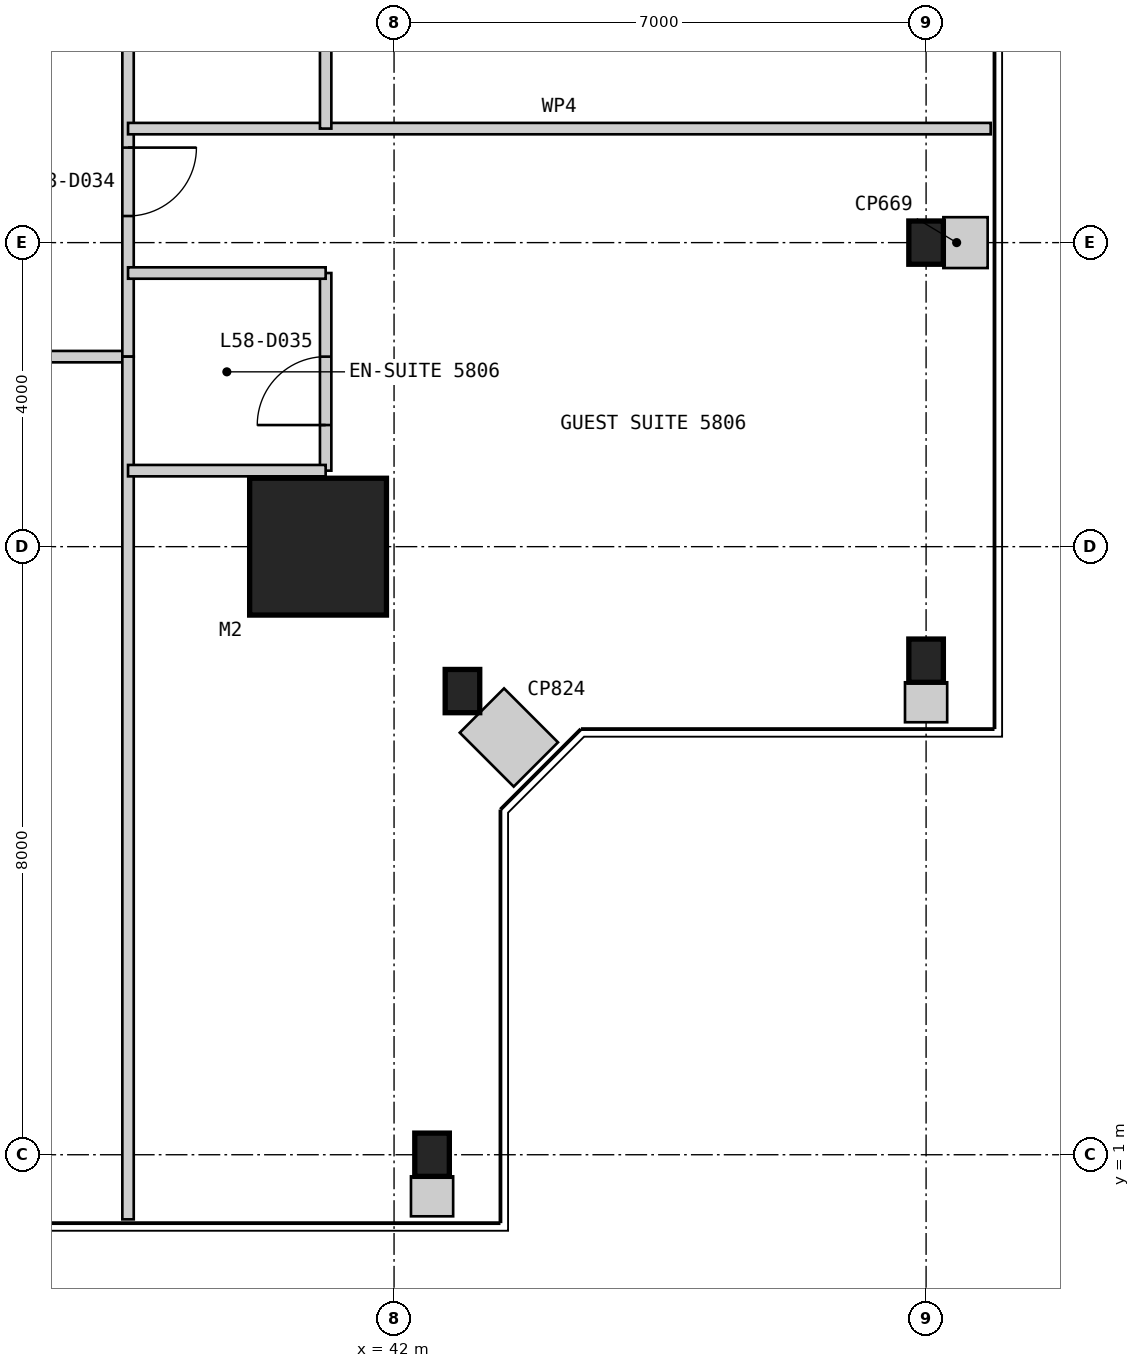
"""IFC4 building model, lengths in metres.
Left out: names, types, materials, properties, quantities, classifications, styles, units other than length and angle.
Written with IfcOpenShell. Run it as: python <this file> out.ifc"""

import sys

from ifc_helpers import new_model, si_unit, direction, frame, frame_2d, origin, origin_2d, place, context, subcontext, project, spatial, rectangle, i_section, extrude, element, fill, save


model = new_model("IFC4")
c1 = context("Model", 3, precision=1e-05, world=origin(), true_north=direction((0.0, 1.0)))
c2 = subcontext(c1, "Body", "Model", "MODEL_VIEW")
j1 = project(units=[si_unit("LENGTHUNIT", "METRE"), si_unit("PLANEANGLEUNIT", "RADIAN")], contexts=[c1])
p1 = place(None, origin())
s1 = spatial("IfcSite", under=j1, at=p1, CompositionType="ELEMENT")
p2 = place(p1, origin())
s2 = spatial("IfcBuilding", under=s1, at=p2, CompositionType="ELEMENT")
p3 = place(p2, frame((0.0, 0.0, 249.2)))
s3 = spatial("IfcBuildingStorey", under=s2, at=p3, CompositionType="ELEMENT", Elevation=249.2)
p4 = place(p3, frame((41.0, 9.0, 0.0), z_axis=(0.0, 0.0, 1.0), x_axis=(1.0, 0.0, 0.0)))
e1 = element("IfcColumn", 1, at=p4, inside=s3, PredefinedType="COLUMN", context=c2, shape_type="SweptSolid", body=[
    extrude(rectangle(XDim=1.8, YDim=1.8, at=origin_2d()), origin(), (0.0, 0.0, 1.0), 3.4),
])
for number, where, z_axis, x_axis in (
    (2, (42.5, 1.0, 0.0), (0.0, 0.0, 1.0), (1.0, 0.0, 0.0)),
    (3, (42.9, 7.1, 0.0), (0.0, 0.0, 1.0), (1.0, 0.0, 0.0)),
    (4, (49.0, 7.5, 0.0), (0.0, 0.0, 1.0), (1.0, 0.0, 0.0)),
    (5, (49.0, 13.0, 0.0), (0.0, 0.0, 1.0), (1.0, 0.0, 0.0)),
):
    element("IfcColumn", number, at=place(p3, frame(where, z_axis=z_axis, x_axis=x_axis)), inside=s3, PredefinedType="COLUMN", context=c2, shape_type="SweptSolid", body=[
        extrude(i_section(OverallWidth=0.455, OverallDepth=0.569, WebThickness=0.078, FlangeThickness=0.125, at=origin_2d()), origin(), (0.0, 0.0, 1.0), 3.4),
    ])
p5 = place(p3, frame((11.5, 11.5, 0.0), z_axis=(0.0, 0.0, 1.0), x_axis=(1.0, 0.0, 0.0)))
e6 = element("IfcWall", 6, at=p5, inside=s3, PredefinedType="PARTITIONING", context=c2, shape_type="SweptSolid", body=[
    extrude(rectangle(XDim=27.0, YDim=0.15, at=frame_2d((13.5, 0.0))), origin(), (0.0, 0.0, 1.0), 3.25),
])
p6 = place(p5, frame((1.85, 0.0, 0.0)))
e7 = element("IfcOpeningElement", 7, at=p6, cuts=e6, PredefinedType="OPENING", context=c2, shape_type="SweptSolid", body=[
    extrude(rectangle(XDim=0.9, YDim=2.1, at=frame_2d((0.45, 1.05))), frame((0.0, 0.085, 0.0), z_axis=(0.0, -1.0, 0.0), x_axis=(1.0, 0.0, 0.0)), (0.0, 0.0, 1.0), 0.17),
])
p7 = place(p5, frame((6.2, 0.0, 0.0)))
e8 = element("IfcOpeningElement", 8, at=p7, cuts=e6, PredefinedType="OPENING", context=c2, shape_type="SweptSolid", body=[
    extrude(rectangle(XDim=0.9, YDim=2.1, at=frame_2d((0.45, 1.05))), frame((0.0, 0.085, 0.0), z_axis=(0.0, -1.0, 0.0), x_axis=(1.0, 0.0, 0.0)), (0.0, 0.0, 1.0), 0.17),
])
p8 = place(p5, frame((12.2, 0.0, 0.0)))
e9 = element("IfcOpeningElement", 9, at=p8, cuts=e6, PredefinedType="OPENING", context=c2, shape_type="SweptSolid", body=[
    extrude(rectangle(XDim=0.9, YDim=2.1, at=frame_2d((0.45, 1.05))), frame((0.0, 0.085, 0.0), z_axis=(0.0, -1.0, 0.0), x_axis=(1.0, 0.0, 0.0)), (0.0, 0.0, 1.0), 0.17),
])
p9 = place(p5, frame((18.8, 0.0, 0.0)))
e10 = element("IfcOpeningElement", 10, at=p9, cuts=e6, PredefinedType="OPENING", context=c2, shape_type="SweptSolid", body=[
    extrude(rectangle(XDim=1.0, YDim=2.1, at=frame_2d((0.5, 1.05))), frame((0.0, 0.085, 0.0), z_axis=(0.0, -1.0, 0.0), x_axis=(1.0, 0.0, 0.0)), (0.0, 0.0, 1.0), 0.17),
])
p10 = place(p5, frame((24.2, 0.0, 0.0)))
e11 = element("IfcOpeningElement", 11, at=p10, cuts=e6, PredefinedType="OPENING", context=c2, shape_type="SweptSolid", body=[
    extrude(rectangle(XDim=0.9, YDim=2.1, at=frame_2d((0.45, 1.05))), frame((0.0, 0.085, 0.0), z_axis=(0.0, -1.0, 0.0), x_axis=(1.0, 0.0, 0.0)), (0.0, 0.0, 1.0), 0.17),
])
p11 = place(p3, frame((38.5, 11.5, 0.0), z_axis=(0.0, 0.0, 1.0), x_axis=(0.0, 1.0, 0.0)))
e12 = element("IfcWall", 12, at=p11, inside=s3, PredefinedType="PARTITIONING", context=c2, shape_type="SweptSolid", body=[
    extrude(rectangle(XDim=27.0, YDim=0.15, at=frame_2d((13.5, 0.0))), origin(), (0.0, 0.0, 1.0), 3.25),
])
p12 = place(p11, frame((1.85, 0.0, 0.0)))
e13 = element("IfcOpeningElement", 13, at=p12, cuts=e12, PredefinedType="OPENING", context=c2, shape_type="SweptSolid", body=[
    extrude(rectangle(XDim=0.9, YDim=2.1, at=frame_2d((0.45, 1.05))), frame((0.0, 0.085, 0.0), z_axis=(0.0, -1.0, 0.0), x_axis=(1.0, 0.0, 0.0)), (0.0, 0.0, 1.0), 0.17),
])
p13 = place(p11, frame((6.2, 0.0, 0.0)))
e14 = element("IfcOpeningElement", 14, at=p13, cuts=e12, PredefinedType="OPENING", context=c2, shape_type="SweptSolid", body=[
    extrude(rectangle(XDim=0.9, YDim=2.1, at=frame_2d((0.45, 1.05))), frame((0.0, 0.085, 0.0), z_axis=(0.0, -1.0, 0.0), x_axis=(1.0, 0.0, 0.0)), (0.0, 0.0, 1.0), 0.17),
])
p14 = place(p11, frame((12.2, 0.0, 0.0)))
e15 = element("IfcOpeningElement", 15, at=p14, cuts=e12, PredefinedType="OPENING", context=c2, shape_type="SweptSolid", body=[
    extrude(rectangle(XDim=0.9, YDim=2.1, at=frame_2d((0.45, 1.05))), frame((0.0, 0.085, 0.0), z_axis=(0.0, -1.0, 0.0), x_axis=(1.0, 0.0, 0.0)), (0.0, 0.0, 1.0), 0.17),
])
p15 = place(p11, frame((18.2, 0.0, 0.0)))
e16 = element("IfcOpeningElement", 16, at=p15, cuts=e12, PredefinedType="OPENING", context=c2, shape_type="SweptSolid", body=[
    extrude(rectangle(XDim=0.9, YDim=2.1, at=frame_2d((0.45, 1.05))), frame((0.0, 0.085, 0.0), z_axis=(0.0, -1.0, 0.0), x_axis=(1.0, 0.0, 0.0)), (0.0, 0.0, 1.0), 0.17),
])
p16 = place(p11, frame((24.2, 0.0, 0.0)))
e17 = element("IfcOpeningElement", 17, at=p16, cuts=e12, PredefinedType="OPENING", context=c2, shape_type="SweptSolid", body=[
    extrude(rectangle(XDim=0.9, YDim=2.1, at=frame_2d((0.45, 1.05))), frame((0.0, 0.085, 0.0), z_axis=(0.0, -1.0, 0.0), x_axis=(1.0, 0.0, 0.0)), (0.0, 0.0, 1.0), 0.17),
])
p17 = place(p3, frame((38.5, 0.15, 0.0), z_axis=(0.0, 0.0, 1.0), x_axis=(0.0, 1.0, 0.0)))
e18 = element("IfcWall", 18, at=p17, inside=s3, PredefinedType="PARTITIONING", context=c2, shape_type="SweptSolid", body=[
    extrude(rectangle(XDim=11.35, YDim=0.15, at=frame_2d((5.675, 0.0))), origin(), (0.0, 0.0, 1.0), 3.25),
])
p18 = place(p3, frame((41.1, 10.0, 0.0), z_axis=(0.0, 0.0, 1.0), x_axis=(0.0, 1.0, 0.0)))
e19 = element("IfcWall", 19, at=p18, inside=s3, PredefinedType="PARTITIONING", context=c2, shape_type="SweptSolid", body=[
    extrude(rectangle(XDim=2.6, YDim=0.15, at=frame_2d((1.3, 0.0))), origin(), (0.0, 0.0, 1.0), 2.638),
])
p19 = place(p18, frame((0.6, 0.0, 0.0)))
e20 = element("IfcOpeningElement", 20, at=p19, cuts=e19, PredefinedType="OPENING", context=c2, shape_type="SweptSolid", body=[
    extrude(rectangle(XDim=0.9, YDim=2.1, at=frame_2d((0.45, 1.05))), frame((0.0, 0.085, 0.0), z_axis=(0.0, -1.0, 0.0), x_axis=(1.0, 0.0, 0.0)), (0.0, 0.0, 1.0), 0.17),
])
for number, where, z_axis, x_axis in (
    (21, (41.1, 10.0, 0.0), (0.0, 0.0, 1.0), (-1.0, 0.0, 0.0)),
    (22, (41.1, 12.6, 0.0), (0.0, 0.0, 1.0), (-1.0, 0.0, 0.0)),
):
    element("IfcWall", number, at=place(p3, frame(where, z_axis=z_axis, x_axis=x_axis)), inside=s3, PredefinedType="PARTITIONING", context=c2, shape_type="SweptSolid", body=[
        extrude(rectangle(XDim=2.6, YDim=0.15, at=frame_2d((1.3, 0.0))), origin(), (0.0, 0.0, 1.0), 3.25),
    ])
p20 = place(p3, frame((49.85, 14.5, 0.0), z_axis=(0.0, 0.0, 1.0), x_axis=(-1.0, 0.0, 0.0)))
e23 = element("IfcWall", 23, at=p20, inside=s3, PredefinedType="PARTITIONING", context=c2, shape_type="SweptSolid", body=[
    extrude(rectangle(XDim=11.35, YDim=0.15, at=frame_2d((5.675, 0.0))), origin(), (0.0, 0.0, 1.0), 3.25),
])
p21 = place(p3, frame((41.1, 14.5, 0.0), z_axis=(0.0, 0.0, 1.0), x_axis=(0.0, 1.0, 0.0)))
e24 = element("IfcWall", 24, at=p21, inside=s3, PredefinedType="PARTITIONING", context=c2, shape_type="SweptSolid", body=[
    extrude(rectangle(XDim=2.6, YDim=0.15, at=frame_2d((1.3, 0.0))), origin(), (0.0, 0.0, 1.0), 3.25),
])
p22 = place(p3, frame((42.5, 0.19, 0.0), z_axis=(0.0, 0.0, 1.0), x_axis=(0.0, 1.0, 0.0)))
e25 = element("IfcWall", 25, at=p22, inside=s3, PredefinedType="PARTITIONING", context=c2, shape_type="SweptSolid", body=[
    extrude(rectangle(XDim=0.526, YDim=0.555, at=frame_2d((0.263, 0.0))), origin(), (0.0, 0.0, 1.0), 3.25),
])
p23 = place(p3, frame((43.866, 6.134, 0.0), z_axis=(0.0, 0.0, 1.0), x_axis=(-0.707106781187, 0.707106781187, 0.0)))
e26 = element("IfcWall", 26, at=p23, inside=s3, PredefinedType="PARTITIONING", context=c2, shape_type="SweptSolid", body=[
    extrude(rectangle(XDim=1.004, YDim=0.824, at=frame_2d((0.502, 0.0))), origin(), (0.0, 0.0, 1.0), 3.25),
])
p24 = place(p3, frame((49.0, 6.69, 0.0), z_axis=(0.0, 0.0, 1.0), x_axis=(0.0, 1.0, 0.0)))
e27 = element("IfcWall", 27, at=p24, inside=s3, PredefinedType="PARTITIONING", context=c2, shape_type="SweptSolid", body=[
    extrude(rectangle(XDim=0.526, YDim=0.555, at=frame_2d((0.263, 0.0))), origin(), (0.0, 0.0, 1.0), 3.25),
])
p25 = place(p3, frame((49.81, 13.0, 0.0), z_axis=(0.0, 0.0, 1.0), x_axis=(-1.0, 0.0, 0.0)))
e28 = element("IfcWall", 28, at=p25, inside=s3, PredefinedType="PARTITIONING", context=c2, shape_type="SweptSolid", body=[
    extrude(rectangle(XDim=0.583, YDim=0.669, at=frame_2d((0.292, 0.0))), origin(), (0.0, 0.0, 1.0), 3.25),
])
p26 = place(p12, frame((0.9, 0.0, 0.0), z_axis=(0.0, 0.0, 1.0), x_axis=(-1.0, 0.0, 0.0)))
e29 = element("IfcDoor", 29, at=p26, inside=s3, OperationType="SINGLE_SWING_LEFT", PredefinedType="DOOR", context=c2, shape_type="SweptSolid", body=[
    extrude(rectangle(XDim=0.9, YDim=2.1, at=frame_2d((0.45, 1.05))), frame((0.0, 0.025, 0.0), z_axis=(0.0, -1.0, 0.0), x_axis=(1.0, 0.0, 0.0)), (0.0, 0.0, 1.0), 0.05),
])
fill(e13, e29)
p27 = place(p19, origin())
e30 = element("IfcDoor", 30, at=p27, inside=s3, OperationType="SINGLE_SWING_LEFT", PredefinedType="DOOR", context=c2, shape_type="SweptSolid", body=[
    extrude(rectangle(XDim=0.9, YDim=2.1, at=frame_2d((0.45, 1.05))), frame((0.0, 0.025, 0.0), z_axis=(0.0, -1.0, 0.0), x_axis=(1.0, 0.0, 0.0)), (0.0, 0.0, 1.0), 0.05),
])
fill(e20, e30)
save(model, sys.argv[1])
